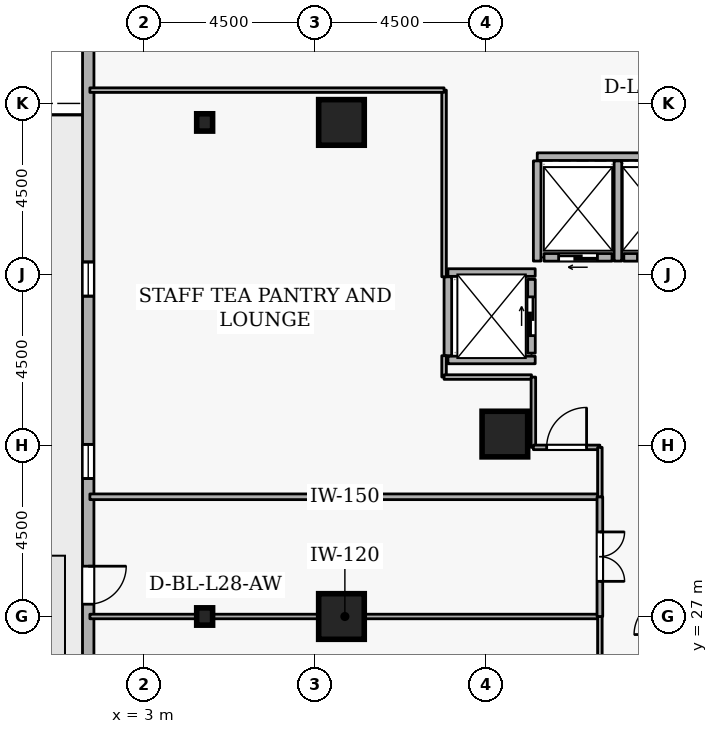
"""IFC4 building model, lengths in metres.
Left out: names, types, materials, properties, quantities, classifications, styles, units other than length and angle.
Written with IfcOpenShell. Run it as: python <this file> out.ifc"""

import sys

from ifc_helpers import new_model, si_unit, direction, frame, frame_2d, origin, origin_2d, place, context, subcontext, project, spatial, rectangle, i_section, extrude, element, fill, save


model = new_model("IFC4")
c1 = context("Model", 3, precision=1e-05, world=origin(), true_north=direction((0.0, 1.0)))
c2 = subcontext(c1, "Body", "Model", "MODEL_VIEW")
j1 = project(units=[si_unit("LENGTHUNIT", "METRE"), si_unit("PLANEANGLEUNIT", "RADIAN")], contexts=[c1])
p1 = place(None, origin())
s1 = spatial("IfcSite", under=j1, at=p1, CompositionType="ELEMENT")
p2 = place(p1, origin())
s2 = spatial("IfcBuilding", under=s1, at=p2, CompositionType="ELEMENT")
p3 = place(p2, frame((0.0, 0.0, 108.9)))
s3 = spatial("IfcBuildingStorey", under=s2, at=p3, CompositionType="ELEMENT", Elevation=108.9)
for number, where, z_axis, x_axis in (
    (1, (8.2, 27.0, 0.0), (0.0, 0.0, 1.0), (1.0, 0.0, 0.0)),
    (2, (8.2, 40.0, 0.0), (0.0, 0.0, 1.0), (1.0, 0.0, 0.0)),
    (3, (12.5, 31.8, 0.0), (0.0, 0.0, 1.0), (1.0, 0.0, 0.0)),
):
    element("IfcColumn", number, at=place(p3, frame(where, z_axis=z_axis, x_axis=x_axis)), inside=s3, PredefinedType="COLUMN", context=c2, shape_type="SweptSolid", body=[
        extrude(rectangle(XDim=1.2, YDim=1.2, at=origin_2d()), origin(), (0.0, 0.0, 1.0), 3.6),
    ])
for number, where, z_axis, x_axis in (
    (4, (4.6, 27.0, 0.0), (0.0, 0.0, 1.0), (1.0, 0.0, 0.0)),
    (5, (4.6, 40.0, 0.0), (0.0, 0.0, 1.0), (1.0, 0.0, 0.0)),
):
    element("IfcColumn", number, at=place(p3, frame(where, z_axis=z_axis, x_axis=x_axis)), inside=s3, PredefinedType="COLUMN", context=c2, shape_type="SweptSolid", body=[
        extrude(i_section(OverallWidth=0.418, OverallDepth=0.456, WebThickness=0.042, FlangeThickness=0.067, FilletRadius=0.015, at=origin_2d()), origin(), (0.0, 0.0, 1.0), 3.6),
    ])
p4 = place(p3, frame((1.537, 47.729, 0.0), z_axis=(0.0, 0.0, 1.0), x_axis=(-5.4088042e-05, -0.999999998537, 0.0)))
e6 = element("IfcWall", 6, at=p4, inside=s3, PredefinedType="STANDARD", context=c2, shape_type="SweptSolid", body=[
    extrude(rectangle(XDim=36.11, YDim=0.3, at=frame_2d((18.055, 0.0))), origin(), (0.0, 0.0, 1.0), 2.7),
])
p5 = place(p4, frame((19.405, 0.0, 0.0)))
e7 = element("IfcOpeningElement", 7, at=p5, cuts=e6, PredefinedType="OPENING", context=c2, shape_type="SweptSolid", body=[
    extrude(rectangle(XDim=1.0, YDim=2.08, at=frame_2d((0.5, 1.04))), frame((0.0, 0.16, 0.0), z_axis=(0.0, -1.0, 0.0), x_axis=(1.0, 0.0, 0.0)), (0.0, 0.0, 1.0), 0.32),
])
p6 = place(p4, frame((1.8, 0.0, 0.72)))
e8 = element("IfcOpeningElement", 8, at=p6, cuts=e6, PredefinedType="OPENING", context=c2, shape_type="SweptSolid", body=[
    extrude(rectangle(XDim=0.9, YDim=1.75, at=frame_2d((0.45, 0.875))), frame((0.0, 0.16, 0.0), z_axis=(0.0, -1.0, 0.0), x_axis=(1.0, 0.0, 0.0)), (0.0, 0.0, 1.0), 0.32),
])
p7 = place(p4, frame((11.4, 0.0, 0.72)))
e9 = element("IfcOpeningElement", 9, at=p7, cuts=e6, PredefinedType="OPENING", context=c2, shape_type="SweptSolid", body=[
    extrude(rectangle(XDim=0.9, YDim=1.75, at=frame_2d((0.45, 0.875))), frame((0.0, 0.16, 0.0), z_axis=(0.0, -1.0, 0.0), x_axis=(1.0, 0.0, 0.0)), (0.0, 0.0, 1.0), 0.32),
])
p8 = place(p4, frame((16.2, 0.0, 0.72)))
e10 = element("IfcOpeningElement", 10, at=p8, cuts=e6, PredefinedType="OPENING", context=c2, shape_type="SweptSolid", body=[
    extrude(rectangle(XDim=0.9, YDim=1.75, at=frame_2d((0.45, 0.875))), frame((0.0, 0.16, 0.0), z_axis=(0.0, -1.0, 0.0), x_axis=(1.0, 0.0, 0.0)), (0.0, 0.0, 1.0), 0.32),
])
p9 = place(p4, frame((25.8, 0.0, 0.72)))
e11 = element("IfcOpeningElement", 11, at=p9, cuts=e6, PredefinedType="OPENING", context=c2, shape_type="SweptSolid", body=[
    extrude(rectangle(XDim=0.9, YDim=1.75, at=frame_2d((0.45, 0.875))), frame((0.0, 0.16, 0.0), z_axis=(0.0, -1.0, 0.0), x_axis=(1.0, 0.0, 0.0)), (0.0, 0.0, 1.0), 0.32),
])
p10 = place(p4, frame((30.6, 0.0, 0.72)))
e12 = element("IfcOpeningElement", 12, at=p10, cuts=e6, PredefinedType="OPENING", context=c2, shape_type="SweptSolid", body=[
    extrude(rectangle(XDim=0.9, YDim=1.75, at=frame_2d((0.45, 0.875))), frame((0.0, 0.16, 0.0), z_axis=(0.0, -1.0, 0.0), x_axis=(1.0, 0.0, 0.0)), (0.0, 0.0, 1.0), 0.32),
])
p11 = place(p3, frame((17.37, 36.45, 0.0), z_axis=(0.0, 0.0, 1.0), x_axis=(-1.0, 0.0, 0.0)))
e13 = element("IfcWall", 13, at=p11, inside=s3, PredefinedType="STANDARD", context=c2, shape_type="SweptSolid", body=[
    extrude(rectangle(XDim=1.74, YDim=0.2, at=frame_2d((0.87, 0.0))), origin(), (0.0, 0.0, 1.0), 3.34),
])
p12 = place(p11, frame((0.36, 0.0, 0.0)))
e14 = element("IfcOpeningElement", 14, at=p12, cuts=e13, PredefinedType="OPENING", context=c2, shape_type="SweptSolid", body=[
    extrude(rectangle(XDim=1.02, YDim=2.06, at=frame_2d((0.51, 1.03))), frame((0.0, 0.11, 0.0), z_axis=(0.0, -1.0, 0.0), x_axis=(1.0, 0.0, 0.0)), (0.0, 0.0, 1.0), 0.22),
])
p13 = place(p3, frame((15.32, 36.45, 0.0), z_axis=(0.0, 0.0, 1.0), x_axis=(-1.0, 0.0, 0.0)))
e15 = element("IfcWall", 15, at=p13, inside=s3, PredefinedType="STANDARD", context=c2, shape_type="SweptSolid", body=[
    extrude(rectangle(XDim=1.79, YDim=0.2, at=frame_2d((0.895, 0.0))), origin(), (0.0, 0.0, 1.0), 3.34),
])
p14 = place(p13, frame((0.385, 0.0, 0.0)))
e16 = element("IfcOpeningElement", 16, at=p14, cuts=e15, PredefinedType="OPENING", context=c2, shape_type="SweptSolid", body=[
    extrude(rectangle(XDim=1.02, YDim=2.06, at=frame_2d((0.51, 1.03))), frame((0.0, 0.11, 0.0), z_axis=(0.0, -1.0, 0.0), x_axis=(1.0, 0.0, 0.0)), (0.0, 0.0, 1.0), 0.22),
])
p15 = place(p3, frame((13.2, 33.93, 0.0), z_axis=(0.0, 0.0, 1.0), x_axis=(0.0, 1.0, 0.0)))
e17 = element("IfcWall", 17, at=p15, inside=s3, PredefinedType="STANDARD", context=c2, shape_type="SweptSolid", body=[
    extrude(rectangle(XDim=1.94, YDim=0.2, at=frame_2d((0.97, 0.0))), origin(), (0.0, 0.0, 1.0), 3.34),
])
p16 = place(p15, frame((0.46, 0.0, 0.0)))
e18 = element("IfcOpeningElement", 18, at=p16, cuts=e17, PredefinedType="OPENING", context=c2, shape_type="SweptSolid", body=[
    extrude(rectangle(XDim=1.02, YDim=2.06, at=frame_2d((0.51, 1.03))), frame((0.0, 0.11, 0.0), z_axis=(0.0, -1.0, 0.0), x_axis=(1.0, 0.0, 0.0)), (0.0, 0.0, 1.0), 0.22),
])
p17 = place(p3, frame((13.352, 39.1, 0.0), z_axis=(0.0, 0.0, 1.0), x_axis=(1.0, 0.0, 0.0)))
e19 = element("IfcWall", 19, at=p17, inside=s3, PredefinedType="STANDARD", context=c2, shape_type="SweptSolid", body=[
    extrude(rectangle(XDim=4.196, YDim=0.2, at=frame_2d((2.098, 0.0))), origin(), (0.0, 0.0, 1.0), 3.34),
])
for number, where, z_axis, x_axis in (
    (20, (15.475, 36.352, 0.0), (0.0, 0.0, 1.0), (0.0, 1.0, 0.0)),
    (21, (13.35, 36.352, 0.0), (0.0, 0.0, 1.0), (0.0, 1.0, 0.0)),
):
    element("IfcWall", number, at=place(p3, frame(where, z_axis=z_axis, x_axis=x_axis)), inside=s3, PredefinedType="STANDARD", context=c2, shape_type="SweptSolid", body=[
        extrude(rectangle(XDim=2.636, YDim=0.2, at=frame_2d((1.318, 0.0))), origin(), (0.0, 0.0, 1.0), 3.34),
    ])
for number, where, z_axis, x_axis in (
    (22, (11.002, 36.05, 0.0), (0.0, 0.0, 1.0), (1.0, 0.0, 0.0)),
    (23, (11.002, 33.75, 0.0), (0.0, 0.0, 1.0), (1.0, 0.0, 0.0)),
):
    element("IfcWall", number, at=place(p3, frame(where, z_axis=z_axis, x_axis=x_axis)), inside=s3, PredefinedType="STANDARD", context=c2, shape_type="SweptSolid", body=[
        extrude(rectangle(XDim=2.296, YDim=0.2, at=frame_2d((1.148, 0.0))), origin(), (0.0, 0.0, 1.0), 3.34),
    ])
p18 = place(p3, frame((11.0, 33.862, 0.0), z_axis=(0.0, 0.0, 1.0), x_axis=(0.0, 1.0, 0.0)))
e24 = element("IfcWall", 24, at=p18, inside=s3, PredefinedType="STANDARD", context=c2, shape_type="SweptSolid", body=[
    extrude(rectangle(XDim=2.076, YDim=0.2, at=frame_2d((1.038, 0.0))), origin(), (0.0, 0.0, 1.0), 3.34),
])
p19 = place(p3, frame((1.58, 27.0, 0.0), z_axis=(0.0, 0.0, 1.0), x_axis=(1.0, 0.0, 0.0)))
e25 = element("IfcWall", 25, at=p19, inside=s3, PredefinedType="PARTITIONING", context=c2, shape_type="SweptSolid", body=[
    extrude(rectangle(XDim=13.42, YDim=0.12, at=frame_2d((6.71, 0.0))), origin(), (0.0, 0.0, 1.0), 2.882),
])
p20 = place(p3, frame((15.0, 27.0, 0.0), z_axis=(0.0, 0.0, 1.0), x_axis=(0.0, -1.0, 0.0)))
e26 = element("IfcWall", 26, at=p20, inside=s3, PredefinedType="PARTITIONING", context=c2, shape_type="SweptSolid", body=[
    extrude(rectangle(XDim=4.45, YDim=0.12, at=frame_2d((2.225, 0.0))), origin(), (0.0, 0.0, 1.0), 3.34),
])
p21 = place(p20, frame((1.7, 0.0, 0.0)))
e27 = element("IfcOpeningElement", 27, at=p21, cuts=e26, PredefinedType="OPENING", context=c2, shape_type="SweptSolid", body=[
    extrude(rectangle(XDim=1.05, YDim=2.1, at=frame_2d((0.525, 1.05))), frame((0.0, 0.07, 0.0), z_axis=(0.0, -1.0, 0.0), x_axis=(1.0, 0.0, 0.0)), (0.0, 0.0, 1.0), 0.14),
])
p22 = place(p3, frame((1.58, 30.15, 0.0), z_axis=(0.0, 0.0, 1.0), x_axis=(1.0, 0.0, 0.0)))
e28 = element("IfcWall", 28, at=p22, inside=s3, PredefinedType="PARTITIONING", context=c2, shape_type="SweptSolid", body=[
    extrude(rectangle(XDim=13.42, YDim=0.15, at=frame_2d((6.71, 0.0))), origin(), (0.0, 0.0, 1.0), 3.34),
])
p23 = place(p3, frame((15.0, 30.15, 0.0), z_axis=(0.0, 0.0, 1.0), x_axis=(0.0, -1.0, 0.0)))
e29 = element("IfcWall", 29, at=p23, inside=s3, PredefinedType="PARTITIONING", context=c2, shape_type="SweptSolid", body=[
    extrude(rectangle(XDim=3.15, YDim=0.15, at=frame_2d((1.575, 0.0))), origin(), (0.0, 0.0, 1.0), 3.34),
])
p24 = place(p23, frame((0.925, 0.0, 0.0)))
e30 = element("IfcOpeningElement", 30, at=p24, cuts=e29, PredefinedType="OPENING", context=c2, shape_type="SweptSolid", body=[
    extrude(rectangle(XDim=1.3, YDim=2.12, at=frame_2d((0.65, 1.06))), frame((0.0, 0.085, 0.0), z_axis=(0.0, -1.0, 0.0), x_axis=(1.0, 0.0, 0.0)), (0.0, 0.0, 1.0), 0.17),
])
p25 = place(p3, frame((10.9, 40.85, 0.0), z_axis=(0.0, 0.0, 1.0), x_axis=(0.0, -1.0, 0.0)))
e31 = element("IfcWall", 31, at=p25, inside=s3, PredefinedType="PARTITIONING", context=c2, shape_type="SweptSolid", body=[
    extrude(rectangle(XDim=4.912, YDim=0.12, at=frame_2d((2.456, 0.0))), origin(), (0.0, 0.0, 1.0), 3.34),
])
p26 = place(p3, frame((10.9, 33.862, 0.0), z_axis=(0.0, 0.0, 1.0), x_axis=(0.0, -1.0, 0.0)))
e32 = element("IfcWall", 32, at=p26, inside=s3, PredefinedType="PARTITIONING", context=c2, shape_type="SweptSolid", body=[
    extrude(rectangle(XDim=0.562, YDim=0.12, at=frame_2d((0.281, 0.0))), origin(), (0.0, 0.0, 1.0), 3.34),
])
p27 = place(p3, frame((10.9, 33.3, 0.0), z_axis=(0.0, 0.0, 1.0), x_axis=(1.0, 0.0, 0.0)))
e33 = element("IfcWall", 33, at=p27, inside=s3, PredefinedType="PARTITIONING", context=c2, shape_type="SweptSolid", body=[
    extrude(rectangle(XDim=2.3, YDim=0.12, at=frame_2d((1.15, 0.0))), origin(), (0.0, 0.0, 1.0), 3.34),
])
p28 = place(p3, frame((13.25, 33.3, 0.0), z_axis=(0.0, 0.0, 1.0), x_axis=(0.0, -1.0, 0.0)))
e34 = element("IfcWall", 34, at=p28, inside=s3, PredefinedType="PARTITIONING", context=c2, shape_type="SweptSolid", body=[
    extrude(rectangle(XDim=1.85, YDim=0.12, at=frame_2d((0.925, 0.0))), origin(), (0.0, 0.0, 1.0), 3.34),
])
p29 = place(p3, frame((13.25, 31.45, 0.0), z_axis=(0.0, 0.0, 1.0), x_axis=(1.0, 0.0, 0.0)))
e35 = element("IfcWall", 35, at=p29, inside=s3, PredefinedType="PARTITIONING", context=c2, shape_type="SweptSolid", body=[
    extrude(rectangle(XDim=1.75, YDim=0.12, at=frame_2d((0.875, 0.0))), origin(), (0.0, 0.0, 1.0), 3.34),
])
p30 = place(p29, frame((0.35, 0.0, 0.0)))
e36 = element("IfcOpeningElement", 36, at=p30, cuts=e35, PredefinedType="OPENING", context=c2, shape_type="SweptSolid", body=[
    extrude(rectangle(XDim=1.05, YDim=2.1, at=frame_2d((0.525, 1.05))), frame((0.0, 0.07, 0.0), z_axis=(0.0, -1.0, 0.0), x_axis=(1.0, 0.0, 0.0)), (0.0, 0.0, 1.0), 0.14),
])
p31 = place(p3, frame((15.0, 31.45, 0.0), z_axis=(0.0, 0.0, 1.0), x_axis=(0.0, -1.0, 0.0)))
e37 = element("IfcWall", 37, at=p31, inside=s3, PredefinedType="PARTITIONING", context=c2, shape_type="SweptSolid", body=[
    extrude(rectangle(XDim=1.3, YDim=0.12, at=frame_2d((0.65, 0.0))), origin(), (0.0, 0.0, 1.0), 3.34),
])
p32 = place(p3, frame((1.58, 40.85, 0.0), z_axis=(0.0, 0.0, 1.0), x_axis=(1.0, 0.0, 0.0)))
e38 = element("IfcWall", 38, at=p32, inside=s3, PredefinedType="PARTITIONING", context=c2, shape_type="SweptSolid", body=[
    extrude(rectangle(XDim=9.32, YDim=0.12, at=frame_2d((4.66, 0.0))), origin(), (0.0, 0.0, 1.0), 3.34),
])
p33 = place(p5, origin())
e39 = element("IfcDoor", 39, at=p33, inside=s3, OperationType="SINGLE_SWING_LEFT", PredefinedType="DOOR", context=c2, shape_type="SweptSolid", body=[
    extrude(rectangle(XDim=1.0, YDim=2.08, at=frame_2d((0.5, 1.04))), frame((0.0, 0.025, 0.0), z_axis=(0.0, -1.0, 0.0), x_axis=(1.0, 0.0, 0.0)), (0.0, 0.0, 1.0), 0.05),
])
fill(e7, e39)
p34 = place(p7, origin())
e40 = element("IfcWindow", 40, at=p34, inside=s3, PartitioningType="SINGLE_PANEL", PredefinedType="WINDOW", context=c2, shape_type="SweptSolid", body=[
    extrude(rectangle(XDim=0.9, YDim=1.75, at=frame_2d((0.45, 0.875))), frame((0.0, 0.03, 0.0), z_axis=(0.0, -1.0, 0.0), x_axis=(1.0, 0.0, 0.0)), (0.0, 0.0, 1.0), 0.06),
])
fill(e9, e40)
p35 = place(p8, origin())
e41 = element("IfcWindow", 41, at=p35, inside=s3, PartitioningType="SINGLE_PANEL", PredefinedType="WINDOW", context=c2, shape_type="SweptSolid", body=[
    extrude(rectangle(XDim=0.9, YDim=1.75, at=frame_2d((0.45, 0.875))), frame((0.0, 0.03, 0.0), z_axis=(0.0, -1.0, 0.0), x_axis=(1.0, 0.0, 0.0)), (0.0, 0.0, 1.0), 0.06),
])
fill(e10, e41)
p36 = place(p12, origin())
e42 = element("IfcDoor", 42, at=p36, inside=s3, OperationType="SLIDING_TO_LEFT", PredefinedType="DOOR", context=c2, shape_type="SweptSolid", body=[
    extrude(rectangle(XDim=1.02, YDim=2.06, at=frame_2d((0.51, 1.03))), frame((0.0, 0.025, 0.0), z_axis=(0.0, -1.0, 0.0), x_axis=(1.0, 0.0, 0.0)), (0.0, 0.0, 1.0), 0.05),
])
fill(e14, e42)
p37 = place(p14, origin())
e43 = element("IfcDoor", 43, at=p37, inside=s3, OperationType="SLIDING_TO_LEFT", PredefinedType="DOOR", context=c2, shape_type="SweptSolid", body=[
    extrude(rectangle(XDim=1.02, YDim=2.06, at=frame_2d((0.51, 1.03))), frame((0.0, 0.025, 0.0), z_axis=(0.0, -1.0, 0.0), x_axis=(1.0, 0.0, 0.0)), (0.0, 0.0, 1.0), 0.05),
])
fill(e16, e43)
p38 = place(p16, origin())
e44 = element("IfcDoor", 44, at=p38, inside=s3, OperationType="SLIDING_TO_LEFT", PredefinedType="DOOR", context=c2, shape_type="SweptSolid", body=[
    extrude(rectangle(XDim=1.02, YDim=2.06, at=frame_2d((0.51, 1.03))), frame((0.0, 0.025, 0.0), z_axis=(0.0, -1.0, 0.0), x_axis=(1.0, 0.0, 0.0)), (0.0, 0.0, 1.0), 0.05),
])
fill(e18, e44)
p39 = place(p24, origin())
e45 = element("IfcDoor", 45, at=p39, inside=s3, OperationType="DOUBLE_DOOR_SINGLE_SWING", PredefinedType="DOOR", context=c2, shape_type="SweptSolid", body=[
    extrude(rectangle(XDim=1.3, YDim=2.12, at=frame_2d((0.65, 1.06))), frame((0.0, 0.025, 0.0), z_axis=(0.0, -1.0, 0.0), x_axis=(1.0, 0.0, 0.0)), (0.0, 0.0, 1.0), 0.05),
])
fill(e30, e45)
p40 = place(p30, origin())
e46 = element("IfcDoor", 46, at=p40, inside=s3, OperationType="SINGLE_SWING_RIGHT", PredefinedType="DOOR", context=c2, shape_type="SweptSolid", body=[
    extrude(rectangle(XDim=1.05, YDim=2.1, at=frame_2d((0.525, 1.05))), frame((0.0, 0.025, 0.0), z_axis=(0.0, -1.0, 0.0), x_axis=(1.0, 0.0, 0.0)), (0.0, 0.0, 1.0), 0.05),
])
fill(e36, e46)
save(model, sys.argv[1])
